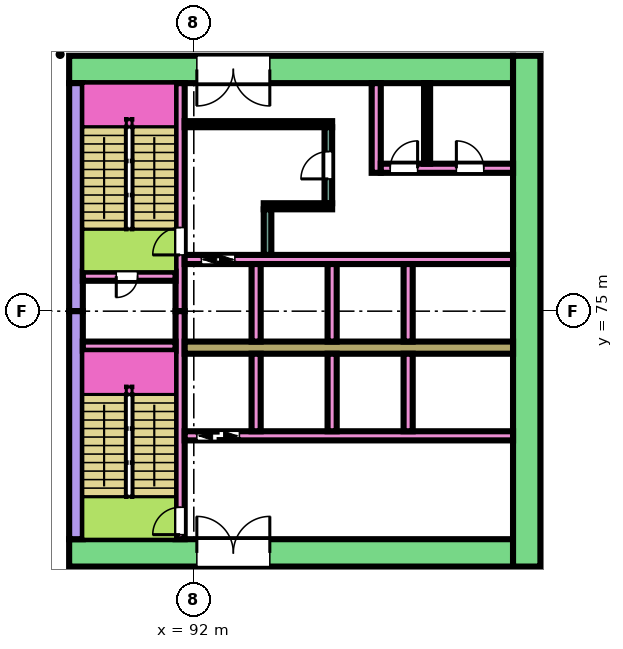
"""IFC4 building model, lengths in metres.
Left out: names, types, materials, properties, quantities, classifications, styles, units other than length and angle.
Written with IfcOpenShell. Run it as: python <this file> out.ifc"""

import sys

from ifc_helpers import new_model, si_unit, direction, frame, frame_2d, origin, place, context, subcontext, project, spatial, rectangle, extrude, element, fill, save


model = new_model("IFC4")
c1 = context("Model", 3, precision=1e-05, world=origin(), true_north=direction((0.0, 1.0)))
c2 = subcontext(c1, "Body", "Model", "MODEL_VIEW")
j1 = project(units=[si_unit("LENGTHUNIT", "METRE"), si_unit("PLANEANGLEUNIT", "RADIAN")], contexts=[c1])
p1 = place(None, origin())
s1 = spatial("IfcSite", under=j1, at=p1, CompositionType="ELEMENT")
p2 = place(p1, origin())
s2 = spatial("IfcBuilding", under=s1, at=p2, CompositionType="ELEMENT")
p3 = place(p2, frame((0.0, 0.0, -4.5)))
s3 = spatial("IfcBuildingStorey", under=s2, at=p3, CompositionType="ELEMENT", Elevation=-4.5)
p4 = place(p3, frame((87.9, 82.95, 0.0), z_axis=(0.0, 0.0, 1.0), x_axis=(1.0, 0.0, 0.0)))
e1 = element("IfcWall", 1, at=p4, inside=s3, PredefinedType="SHEAR", context=c2, shape_type="SweptSolid", body=[
    extrude(rectangle(XDim=14.6, YDim=0.9, at=frame_2d((7.3, 0.0))), origin(), (0.0, 0.0, 1.0), 4.05),
])
p5 = place(p4, frame((4.2, 0.0, 0.0)))
e2 = element("IfcOpeningElement", 2, at=p5, cuts=e1, PredefinedType="OPENING", context=c2, shape_type="SweptSolid", body=[
    extrude(rectangle(XDim=2.4, YDim=2.4, at=frame_2d((1.2, 1.2))), frame((0.0, 0.46, 0.0), z_axis=(0.0, -1.0, 0.0), x_axis=(1.0, 0.0, 0.0)), (0.0, 0.0, 1.0), 0.92),
])
p6 = place(p3, frame((87.9, 67.05, 0.0), z_axis=(0.0, 0.0, 1.0), x_axis=(1.0, 0.0, 0.0)))
e3 = element("IfcWall", 3, at=p6, inside=s3, PredefinedType="SHEAR", context=c2, shape_type="SweptSolid", body=[
    extrude(rectangle(XDim=14.6, YDim=0.9, at=frame_2d((7.3, 0.0))), origin(), (0.0, 0.0, 1.0), 4.05),
])
p7 = place(p6, frame((4.2, 0.0, 0.0)))
e4 = element("IfcOpeningElement", 4, at=p7, cuts=e3, PredefinedType="OPENING", context=c2, shape_type="SweptSolid", body=[
    extrude(rectangle(XDim=2.4, YDim=2.4, at=frame_2d((1.2, 1.2))), frame((0.0, 0.46, 0.0), z_axis=(0.0, -1.0, 0.0), x_axis=(1.0, 0.0, 0.0)), (0.0, 0.0, 1.0), 0.92),
])
for number, where, z_axis, x_axis in (
    (5, (88.125, 75.0, 0.0), (0.0, 0.0, 1.0), (0.0, 1.0, 0.0)),
    (6, (88.125, 67.5, 0.0), (0.0, 0.0, 1.0), (0.0, 1.0, 0.0)),
):
    element("IfcWall", number, at=place(p3, frame(where, z_axis=z_axis, x_axis=x_axis)), inside=s3, PredefinedType="SHEAR", context=c2, shape_type="SweptSolid", body=[
        extrude(rectangle(XDim=7.5, YDim=0.45, at=frame_2d((3.75, 0.0))), origin(), (0.0, 0.0, 1.0), 4.05),
    ])
p8 = place(p3, frame((102.95, 66.6, 0.0), z_axis=(0.0, 0.0, 1.0), x_axis=(0.0, 1.0, 0.0)))
e7 = element("IfcWall", 7, at=p8, inside=s3, PredefinedType="SHEAR", context=c2, shape_type="SweptSolid", body=[
    extrude(rectangle(XDim=16.8, YDim=0.9, at=frame_2d((8.4, 0.0))), origin(), (0.0, 0.0, 1.0), 4.05),
])
p9 = place(p3, frame((91.55, 75.0, 0.0), z_axis=(0.0, 0.0, 1.0), x_axis=(0.0, 1.0, 0.0)))
e8 = element("IfcWall", 8, at=p9, inside=s3, PredefinedType="SHEAR", context=c2, shape_type="SweptSolid", body=[
    extrude(rectangle(XDim=7.5, YDim=0.3, at=frame_2d((3.75, 0.0))), origin(), (0.0, 0.0, 1.0), 4.05),
])
p10 = place(p9, frame((1.85, 0.0, 0.0)))
e9 = element("IfcOpeningElement", 9, at=p10, cuts=e8, PredefinedType="OPENING", context=c2, shape_type="SweptSolid", body=[
    extrude(rectangle(XDim=0.9, YDim=2.1, at=frame_2d((0.45, 1.05))), frame((0.0, 0.16, 0.0), z_axis=(0.0, -1.0, 0.0), x_axis=(1.0, 0.0, 0.0)), (0.0, 0.0, 1.0), 0.32),
])
p11 = place(p3, frame((91.55, 67.5, 0.0), z_axis=(0.0, 0.0, 1.0), x_axis=(0.0, 1.0, 0.0)))
e10 = element("IfcWall", 10, at=p11, inside=s3, PredefinedType="SHEAR", context=c2, shape_type="SweptSolid", body=[
    extrude(rectangle(XDim=7.5, YDim=0.3, at=frame_2d((3.75, 0.0))), origin(), (0.0, 0.0, 1.0), 4.05),
])
p12 = place(p11, frame((0.15, 0.0, 0.0)))
e11 = element("IfcOpeningElement", 11, at=p12, cuts=e10, PredefinedType="OPENING", context=c2, shape_type="SweptSolid", body=[
    extrude(rectangle(XDim=0.9, YDim=2.1, at=frame_2d((0.45, 1.05))), frame((0.0, 0.16, 0.0), z_axis=(0.0, -1.0, 0.0), x_axis=(1.0, 0.0, 0.0)), (0.0, 0.0, 1.0), 0.32),
])
p13 = place(p3, frame((88.35, 76.15, 0.0), z_axis=(0.0, 0.0, 1.0), x_axis=(1.0, 0.0, 0.0)))
e12 = element("IfcWall", 12, at=p13, inside=s3, PredefinedType="SHEAR", context=c2, shape_type="SweptSolid", body=[
    extrude(rectangle(XDim=3.05, YDim=0.3, at=frame_2d((1.525, 0.0))), origin(), (0.0, 0.0, 1.0), 4.05),
])
p14 = place(p13, frame((1.1, 0.0, 0.0)))
e13 = element("IfcOpeningElement", 13, at=p14, cuts=e12, PredefinedType="OPENING", context=c2, shape_type="SweptSolid", body=[
    extrude(rectangle(XDim=0.7, YDim=2.0, at=frame_2d((0.35, 1.0))), frame((0.0, 0.16, 0.0), z_axis=(0.0, -1.0, 0.0), x_axis=(1.0, 0.0, 0.0)), (0.0, 0.0, 1.0), 0.32),
])
p15 = place(p3, frame((88.35, 73.85, 0.0), z_axis=(0.0, 0.0, 1.0), x_axis=(1.0, 0.0, 0.0)))
e14 = element("IfcWall", 14, at=p15, inside=s3, PredefinedType="SHEAR", context=c2, shape_type="SweptSolid", body=[
    extrude(rectangle(XDim=3.05, YDim=0.3, at=frame_2d((1.525, 0.0))), origin(), (0.0, 0.0, 1.0), 4.05),
])
p16 = place(p3, frame((91.7, 76.7, 0.0), z_axis=(0.0, 0.0, 1.0), x_axis=(1.0, 0.0, 0.0)))
e15 = element("IfcWall", 15, at=p16, inside=s3, PredefinedType="SHEAR", context=c2, shape_type="SweptSolid", body=[
    extrude(rectangle(XDim=10.8, YDim=0.3, at=frame_2d((5.4, 0.0))), origin(), (0.0, 0.0, 1.0), 4.05),
])
p17 = place(p16, frame((0.55, 0.0, 0.0)))
e16 = element("IfcOpeningElement", 16, at=p17, cuts=e15, PredefinedType="OPENING", context=c2, shape_type="SweptSolid", body=[
    extrude(rectangle(XDim=1.1, YDim=2.1, at=frame_2d((0.55, 1.05))), frame((0.0, 0.16, 0.0), z_axis=(0.0, -1.0, 0.0), x_axis=(1.0, 0.0, 0.0)), (0.0, 0.0, 1.0), 0.32),
])
p18 = place(p3, frame((91.7, 73.8, 0.0), z_axis=(0.0, 0.0, 1.0), x_axis=(1.0, 0.0, 0.0)))
e17 = element("IfcWall", 17, at=p18, inside=s3, PredefinedType="SHEAR", context=c2, shape_type="SweptSolid", body=[
    extrude(rectangle(XDim=10.8, YDim=0.4, at=frame_2d((5.4, 0.0))), origin(), (0.0, 0.0, 1.0), 4.05),
])
p19 = place(p3, frame((91.7, 70.9, 0.0), z_axis=(0.0, 0.0, 1.0), x_axis=(1.0, 0.0, 0.0)))
e18 = element("IfcWall", 18, at=p19, inside=s3, PredefinedType="SHEAR", context=c2, shape_type="SweptSolid", body=[
    extrude(rectangle(XDim=10.8, YDim=0.3, at=frame_2d((5.4, 0.0))), origin(), (0.0, 0.0, 1.0), 4.05),
])
p20 = place(p19, frame((0.4, 0.0, 0.0)))
e19 = element("IfcOpeningElement", 19, at=p20, cuts=e18, PredefinedType="OPENING", context=c2, shape_type="SweptSolid", body=[
    extrude(rectangle(XDim=1.4, YDim=2.1, at=frame_2d((0.7, 1.05))), frame((0.0, 0.16, 0.0), z_axis=(0.0, -1.0, 0.0), x_axis=(1.0, 0.0, 0.0)), (0.0, 0.0, 1.0), 0.32),
])
for number, where, z_axis, x_axis in (
    (20, (94.05, 74.0, 0.0), (0.0, 0.0, 1.0), (0.0, 1.0, 0.0)),
    (21, (96.55, 74.0, 0.0), (0.0, 0.0, 1.0), (0.0, 1.0, 0.0)),
    (22, (99.05, 74.0, 0.0), (0.0, 0.0, 1.0), (0.0, 1.0, 0.0)),
    (23, (94.05, 71.05, 0.0), (0.0, 0.0, 1.0), (0.0, 1.0, 0.0)),
    (24, (96.55, 71.05, 0.0), (0.0, 0.0, 1.0), (0.0, 1.0, 0.0)),
    (25, (99.05, 71.05, 0.0), (0.0, 0.0, 1.0), (0.0, 1.0, 0.0)),
):
    element("IfcWall", number, at=place(p3, frame(where, z_axis=z_axis, x_axis=x_axis)), inside=s3, PredefinedType="SHEAR", context=c2, shape_type="SweptSolid", body=[
        extrude(rectangle(XDim=2.55, YDim=0.3, at=frame_2d((1.275, 0.0))), origin(), (0.0, 0.0, 1.0), 4.05),
    ])
p21 = place(p3, frame((91.7, 81.15, 0.0), z_axis=(0.0, 0.0, 1.0), x_axis=(1.0, 0.0, 0.0)))
e26 = element("IfcWall", 26, at=p21, inside=s3, PredefinedType="SHEAR", context=c2, shape_type="SweptSolid", body=[
    extrude(rectangle(XDim=4.85, YDim=0.2, at=frame_2d((2.425, 0.0))), origin(), (0.0, 0.0, 1.0), 4.05),
])
p22 = place(p3, frame((96.425, 78.55, 0.0), z_axis=(0.0, 0.0, 1.0), x_axis=(0.0, 1.0, 0.0)))
e27 = element("IfcWall", 27, at=p22, inside=s3, PredefinedType="SHEAR", context=c2, shape_type="SweptSolid", body=[
    extrude(rectangle(XDim=2.5, YDim=0.25, at=frame_2d((1.25, 0.0))), origin(), (0.0, 0.0, 1.0), 4.05),
])
p23 = place(p22, frame((0.8, 0.0, 0.0)))
e28 = element("IfcOpeningElement", 28, at=p23, cuts=e27, PredefinedType="OPENING", context=c2, shape_type="SweptSolid", body=[
    extrude(rectangle(XDim=0.9, YDim=2.1, at=frame_2d((0.45, 1.05))), frame((0.0, 0.135, 0.0), z_axis=(0.0, -1.0, 0.0), x_axis=(1.0, 0.0, 0.0)), (0.0, 0.0, 1.0), 0.27),
])
p24 = place(p3, frame((94.3, 78.45, 0.0), z_axis=(0.0, 0.0, 1.0), x_axis=(1.0, 0.0, 0.0)))
e29 = element("IfcWall", 29, at=p24, inside=s3, PredefinedType="SHEAR", context=c2, shape_type="SweptSolid", body=[
    extrude(rectangle(XDim=2.25, YDim=0.2, at=frame_2d((1.125, 0.0))), origin(), (0.0, 0.0, 1.0), 4.05),
])
p25 = place(p3, frame((94.425, 76.85, 0.0), z_axis=(0.0, 0.0, 1.0), x_axis=(0.0, 1.0, 0.0)))
e30 = element("IfcWall", 30, at=p25, inside=s3, PredefinedType="SHEAR", context=c2, shape_type="SweptSolid", body=[
    extrude(rectangle(XDim=1.5, YDim=0.25, at=frame_2d((0.75, 0.0))), origin(), (0.0, 0.0, 1.0), 4.05),
])
p26 = place(p3, frame((98.0, 79.55, 0.0), z_axis=(0.0, 0.0, 1.0), x_axis=(0.0, 1.0, 0.0)))
e31 = element("IfcWall", 31, at=p26, inside=s3, PredefinedType="SHEAR", context=c2, shape_type="SweptSolid", body=[
    extrude(rectangle(XDim=2.95, YDim=0.3, at=frame_2d((1.475, 0.0))), origin(), (0.0, 0.0, 1.0), 4.05),
])
p27 = place(p3, frame((98.15, 79.7, 0.0), z_axis=(0.0, 0.0, 1.0), x_axis=(1.0, 0.0, 0.0)))
e32 = element("IfcWall", 32, at=p27, inside=s3, PredefinedType="SHEAR", context=c2, shape_type="SweptSolid", body=[
    extrude(rectangle(XDim=4.35, YDim=0.3, at=frame_2d((2.175, 0.0))), origin(), (0.0, 0.0, 1.0), 4.05),
])
p28 = place(p27, frame((0.311, 0.0, 0.0)))
e33 = element("IfcOpeningElement", 33, at=p28, cuts=e32, PredefinedType="OPENING", context=c2, shape_type="SweptSolid", body=[
    extrude(rectangle(XDim=0.9, YDim=2.1, at=frame_2d((0.45, 1.05))), frame((0.0, 0.16, 0.0), z_axis=(0.0, -1.0, 0.0), x_axis=(1.0, 0.0, 0.0)), (0.0, 0.0, 1.0), 0.32),
])
p29 = place(p27, frame((2.486, 0.0, 0.0)))
e34 = element("IfcOpeningElement", 34, at=p29, cuts=e32, PredefinedType="OPENING", context=c2, shape_type="SweptSolid", body=[
    extrude(rectangle(XDim=0.9, YDim=2.1, at=frame_2d((0.45, 1.05))), frame((0.0, 0.16, 0.0), z_axis=(0.0, -1.0, 0.0), x_axis=(1.0, 0.0, 0.0)), (0.0, 0.0, 1.0), 0.32),
])
p30 = place(p3, frame((99.673, 79.85, 0.0), z_axis=(0.0, 0.0, 1.0), x_axis=(0.0, 1.0, 0.0)))
e35 = element("IfcWall", 35, at=p30, inside=s3, PredefinedType="PARTITIONING", context=c2, shape_type="SweptSolid", body=[
    extrude(rectangle(XDim=2.65, YDim=0.2, at=frame_2d((1.325, 0.0))), origin(), (0.0, 0.0, 1.0), 4.05),
])
p31 = place(p14, frame((0.7, 0.0, 0.0), z_axis=(0.0, 0.0, 1.0), x_axis=(-1.0, 0.0, 0.0)))
e36 = element("IfcDoor", 36, at=p31, inside=s3, OperationType="SINGLE_SWING_RIGHT", PredefinedType="DOOR", context=c2, shape_type="SweptSolid", body=[
    extrude(rectangle(XDim=0.7, YDim=2.0, at=frame_2d((0.35, 1.0))), frame((0.0, 0.025, 0.0), z_axis=(0.0, -1.0, 0.0), x_axis=(1.0, 0.0, 0.0)), (0.0, 0.0, 1.0), 0.05),
])
fill(e13, e36)
p32 = place(p10, origin())
e37 = element("IfcDoor", 37, at=p32, inside=s3, OperationType="SINGLE_SWING_LEFT", PredefinedType="DOOR", context=c2, shape_type="SweptSolid", body=[
    extrude(rectangle(XDim=0.9, YDim=2.1, at=frame_2d((0.45, 1.05))), frame((0.0, 0.025, 0.0), z_axis=(0.0, -1.0, 0.0), x_axis=(1.0, 0.0, 0.0)), (0.0, 0.0, 1.0), 0.05),
])
fill(e9, e37)
p33 = place(p12, origin())
e38 = element("IfcDoor", 38, at=p33, inside=s3, OperationType="SINGLE_SWING_LEFT", PredefinedType="DOOR", context=c2, shape_type="SweptSolid", body=[
    extrude(rectangle(XDim=0.9, YDim=2.1, at=frame_2d((0.45, 1.05))), frame((0.0, 0.025, 0.0), z_axis=(0.0, -1.0, 0.0), x_axis=(1.0, 0.0, 0.0)), (0.0, 0.0, 1.0), 0.05),
])
fill(e11, e38)
p34 = place(p17, origin())
e39 = element("IfcDoor", 39, at=p34, inside=s3, OperationType="DOUBLE_DOOR_SLIDING", PredefinedType="DOOR", context=c2, shape_type="SweptSolid", body=[
    extrude(rectangle(XDim=1.1, YDim=2.1, at=frame_2d((0.55, 1.05))), frame((0.0, 0.025, 0.0), z_axis=(0.0, -1.0, 0.0), x_axis=(1.0, 0.0, 0.0)), (0.0, 0.0, 1.0), 0.05),
])
fill(e16, e39)
p35 = place(p20, origin())
e40 = element("IfcDoor", 40, at=p35, inside=s3, OperationType="DOUBLE_DOOR_SLIDING", PredefinedType="DOOR", context=c2, shape_type="SweptSolid", body=[
    extrude(rectangle(XDim=1.4, YDim=2.1, at=frame_2d((0.7, 1.05))), frame((0.0, 0.025, 0.0), z_axis=(0.0, -1.0, 0.0), x_axis=(1.0, 0.0, 0.0)), (0.0, 0.0, 1.0), 0.05),
])
fill(e19, e40)
p36 = place(p23, origin())
e41 = element("IfcDoor", 41, at=p36, inside=s3, OperationType="SINGLE_SWING_LEFT", PredefinedType="DOOR", context=c2, shape_type="SweptSolid", body=[
    extrude(rectangle(XDim=0.9, YDim=2.1, at=frame_2d((0.45, 1.05))), frame((0.0, 0.025, 0.0), z_axis=(0.0, -1.0, 0.0), x_axis=(1.0, 0.0, 0.0)), (0.0, 0.0, 1.0), 0.05),
])
fill(e28, e41)
p37 = place(p28, origin())
e42 = element("IfcDoor", 42, at=p37, inside=s3, OperationType="SINGLE_SWING_RIGHT", PredefinedType="DOOR", context=c2, shape_type="SweptSolid", body=[
    extrude(rectangle(XDim=0.9, YDim=2.1, at=frame_2d((0.45, 1.05))), frame((0.0, 0.025, 0.0), z_axis=(0.0, -1.0, 0.0), x_axis=(1.0, 0.0, 0.0)), (0.0, 0.0, 1.0), 0.05),
])
fill(e33, e42)
p38 = place(p29, origin())
e43 = element("IfcDoor", 43, at=p38, inside=s3, OperationType="SINGLE_SWING_LEFT", PredefinedType="DOOR", context=c2, shape_type="SweptSolid", body=[
    extrude(rectangle(XDim=0.9, YDim=2.1, at=frame_2d((0.45, 1.05))), frame((0.0, 0.025, 0.0), z_axis=(0.0, -1.0, 0.0), x_axis=(1.0, 0.0, 0.0)), (0.0, 0.0, 1.0), 0.05),
])
fill(e34, e43)
p39 = place(p5, frame((2.4, 0.0, 0.0), z_axis=(0.0, 0.0, 1.0), x_axis=(-1.0, 0.0, 0.0)))
e44 = element("IfcDoor", 44, at=p39, inside=s3, OperationType="DOUBLE_DOOR_SINGLE_SWING", PredefinedType="DOOR", context=c2, shape_type="SweptSolid", body=[
    extrude(rectangle(XDim=2.4, YDim=2.4, at=frame_2d((1.2, 1.2))), frame((0.0, 0.025, 0.0), z_axis=(0.0, -1.0, 0.0), x_axis=(1.0, 0.0, 0.0)), (0.0, 0.0, 1.0), 0.05),
])
fill(e2, e44)
p40 = place(p7, origin())
e45 = element("IfcDoor", 45, at=p40, inside=s3, OperationType="DOUBLE_DOOR_SINGLE_SWING", PredefinedType="DOOR", context=c2, shape_type="SweptSolid", body=[
    extrude(rectangle(XDim=2.4, YDim=2.4, at=frame_2d((1.2, 1.2))), frame((0.0, 0.025, 0.0), z_axis=(0.0, -1.0, 0.0), x_axis=(1.0, 0.0, 0.0)), (0.0, 0.0, 1.0), 0.05),
])
fill(e4, e45)
save(model, sys.argv[1])
